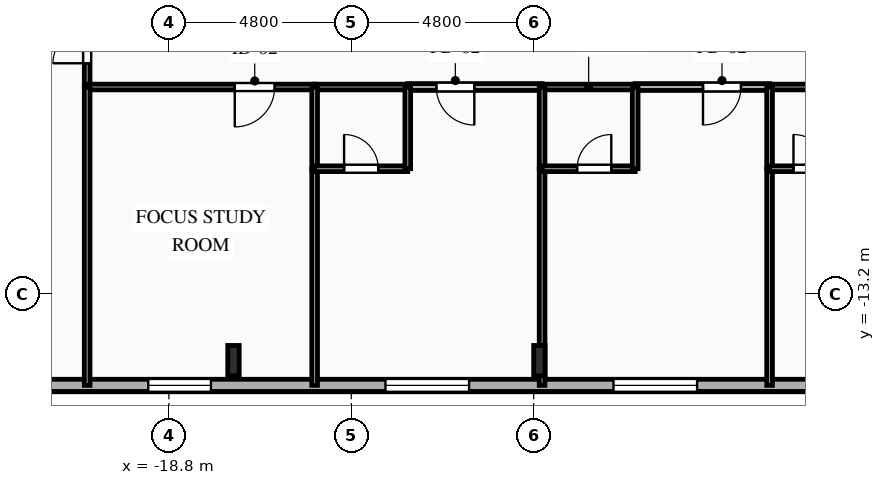
"""IFC4 building model, lengths in metres.
Left out: names, types, materials, properties, quantities, classifications, styles, units other than length and angle.
Written with IfcOpenShell. Run it as: python <this file> out.ifc"""

import sys

from ifc_helpers import new_model, si_unit, direction, frame, frame_2d, origin, origin_2d, place, context, subcontext, project, spatial, rectangle, i_section, extrude, element, fill, save


model = new_model("IFC4")
c1 = context("Model", 3, precision=1e-05, world=origin(), true_north=direction((0.0, 1.0)))
c2 = subcontext(c1, "Body", "Model", "MODEL_VIEW")
j1 = project(units=[si_unit("LENGTHUNIT", "METRE"), si_unit("PLANEANGLEUNIT", "RADIAN")], contexts=[c1])
p1 = place(None, origin())
s1 = spatial("IfcSite", under=j1, at=p1, CompositionType="ELEMENT")
p2 = place(p1, origin())
s2 = spatial("IfcBuilding", under=s1, at=p2, CompositionType="ELEMENT")
p3 = place(p2, frame((0.0, 0.0, 151.1)))
s3 = spatial("IfcBuildingStorey", under=s2, at=p3, CompositionType="ELEMENT", Elevation=151.1)
for number, where, z_axis, x_axis in (
    (1, (-17.1, -14.95, 0.0), (0.0, 0.0, 1.0), (1.0, 0.0, 0.0)),
    (2, (-9.05, -14.95, 0.0), (0.0, 0.0, 1.0), (1.0, 0.0, 0.0)),
):
    element("IfcColumn", number, at=place(p3, frame(where, z_axis=z_axis, x_axis=x_axis)), inside=s3, PredefinedType="COLUMN", context=c2, shape_type="SweptSolid", body=[
        extrude(i_section(OverallWidth=0.3, OverallDepth=0.8, WebThickness=0.018, FlangeThickness=0.033, FilletRadius=0.03, at=origin_2d()), origin(), (0.0, 0.0, 1.0), 3.35),
    ])
p4 = place(p3, frame((23.8, -15.6, 0.0), z_axis=(0.0, 0.0, 1.0), x_axis=(-1.0, 0.0, 0.0)))
e3 = element("IfcWall", 3, at=p4, inside=s3, PredefinedType="SOLIDWALL", context=c2, shape_type="SweptSolid", body=[
    extrude(rectangle(XDim=49.6, YDim=0.32, at=frame_2d((24.8, 0.0))), origin(), (0.0, 0.0, 1.0), 3.04),
])
p5 = place(p4, frame((1.13, 0.0, 0.85)))
e4 = element("IfcOpeningElement", 4, at=p5, cuts=e3, PredefinedType="OPENING", context=c2, shape_type="SweptSolid", body=[
    extrude(rectangle(XDim=1.1, YDim=1.85, at=frame_2d((0.55, 0.925))), frame((0.0, 0.17, 0.0), z_axis=(0.0, -1.0, 0.0), x_axis=(1.0, 0.0, 0.0)), (0.0, 0.0, 1.0), 0.34),
])
p6 = place(p4, frame((5.055, 0.0, 0.85)))
e5 = element("IfcOpeningElement", 5, at=p6, cuts=e3, PredefinedType="OPENING", context=c2, shape_type="SweptSolid", body=[
    extrude(rectangle(XDim=1.65, YDim=1.85, at=frame_2d((0.825, 0.925))), frame((0.0, 0.17, 0.0), z_axis=(0.0, -1.0, 0.0), x_axis=(1.0, 0.0, 0.0)), (0.0, 0.0, 1.0), 0.34),
])
p7 = place(p4, frame((10.78, 0.0, 0.85)))
e6 = element("IfcOpeningElement", 6, at=p7, cuts=e3, PredefinedType="OPENING", context=c2, shape_type="SweptSolid", body=[
    extrude(rectangle(XDim=2.2, YDim=1.85, at=frame_2d((1.1, 0.925))), frame((0.0, 0.17, 0.0), z_axis=(0.0, -1.0, 0.0), x_axis=(1.0, 0.0, 0.0)), (0.0, 0.0, 1.0), 0.34),
])
p8 = place(p4, frame((17.284, 0.0, 0.85)))
e7 = element("IfcOpeningElement", 7, at=p8, cuts=e3, PredefinedType="OPENING", context=c2, shape_type="SweptSolid", body=[
    extrude(rectangle(XDim=2.2, YDim=1.85, at=frame_2d((1.1, 0.925))), frame((0.0, 0.17, 0.0), z_axis=(0.0, -1.0, 0.0), x_axis=(1.0, 0.0, 0.0)), (0.0, 0.0, 1.0), 0.34),
])
p9 = place(p4, frame((22.248, 0.0, 0.85)))
e8 = element("IfcOpeningElement", 8, at=p9, cuts=e3, PredefinedType="OPENING", context=c2, shape_type="SweptSolid", body=[
    extrude(rectangle(XDim=2.2, YDim=1.85, at=frame_2d((1.1, 0.925))), frame((0.0, 0.17, 0.0), z_axis=(0.0, -1.0, 0.0), x_axis=(1.0, 0.0, 0.0)), (0.0, 0.0, 1.0), 0.34),
])
p10 = place(p4, frame((28.7, 0.0, 0.85)))
e9 = element("IfcOpeningElement", 9, at=p10, cuts=e3, PredefinedType="OPENING", context=c2, shape_type="SweptSolid", body=[
    extrude(rectangle(XDim=2.2, YDim=1.85, at=frame_2d((1.1, 0.925))), frame((0.0, 0.17, 0.0), z_axis=(0.0, -1.0, 0.0), x_axis=(1.0, 0.0, 0.0)), (0.0, 0.0, 1.0), 0.34),
])
p11 = place(p4, frame((34.7, 0.0, 0.85)))
e10 = element("IfcOpeningElement", 10, at=p11, cuts=e3, PredefinedType="OPENING", context=c2, shape_type="SweptSolid", body=[
    extrude(rectangle(XDim=2.2, YDim=1.85, at=frame_2d((1.1, 0.925))), frame((0.0, 0.17, 0.0), z_axis=(0.0, -1.0, 0.0), x_axis=(1.0, 0.0, 0.0)), (0.0, 0.0, 1.0), 0.34),
])
p12 = place(p4, frame((41.492, 0.0, 0.85)))
e11 = element("IfcOpeningElement", 11, at=p12, cuts=e3, PredefinedType="OPENING", context=c2, shape_type="SweptSolid", body=[
    extrude(rectangle(XDim=1.65, YDim=1.85, at=frame_2d((0.825, 0.925))), frame((0.0, 0.17, 0.0), z_axis=(0.0, -1.0, 0.0), x_axis=(1.0, 0.0, 0.0)), (0.0, 0.0, 1.0), 0.34),
])
p13 = place(p4, frame((46.175, 0.0, 0.85)))
e12 = element("IfcOpeningElement", 12, at=p13, cuts=e3, PredefinedType="OPENING", context=c2, shape_type="SweptSolid", body=[
    extrude(rectangle(XDim=1.65, YDim=1.85, at=frame_2d((0.825, 0.925))), frame((0.0, 0.17, 0.0), z_axis=(0.0, -1.0, 0.0), x_axis=(1.0, 0.0, 0.0)), (0.0, 0.0, 1.0), 0.34),
])
p14 = place(p3, frame((-20.95, -7.75, 0.0), z_axis=(0.0, 0.0, 1.0), x_axis=(0.0, 1.0, 0.0)))
e13 = element("IfcWall", 13, at=p14, inside=s3, PredefinedType="PARTITIONING", context=c2, shape_type="SweptSolid", body=[
    extrude(rectangle(XDim=2.15, YDim=0.15, at=frame_2d((1.075, 0.0))), origin(), (0.0, 0.0, 1.0), 3.04),
])
p15 = place(p14, frame((0.625, 0.0, 0.0)))
e14 = element("IfcOpeningElement", 14, at=p15, cuts=e13, PredefinedType="OPENING", context=c2, shape_type="SweptSolid", body=[
    extrude(rectangle(XDim=0.9, YDim=2.1, at=frame_2d((0.45, 1.05))), frame((0.0, 0.085, 0.0), z_axis=(0.0, -1.0, 0.0), x_axis=(1.0, 0.0, 0.0)), (0.0, 0.0, 1.0), 0.17),
])
p16 = place(p3, frame((-14.964, -7.75, 0.0), z_axis=(0.0, 0.0, 1.0), x_axis=(-1.0, 0.0, 0.0)))
e15 = element("IfcWall", 15, at=p16, inside=s3, PredefinedType="PARTITIONING", context=c2, shape_type="SweptSolid", body=[
    extrude(rectangle(XDim=5.986, YDim=0.15, at=frame_2d((2.993, 0.0))), origin(), (0.0, 0.0, 1.0), 3.04),
])
p17 = place(p16, frame((1.052, 0.0, 0.0)))
e16 = element("IfcOpeningElement", 16, at=p17, cuts=e15, PredefinedType="OPENING", context=c2, shape_type="SweptSolid", body=[
    extrude(rectangle(XDim=1.05, YDim=2.15, at=frame_2d((0.525, 1.075))), frame((0.0, 0.085, 0.0), z_axis=(0.0, -1.0, 0.0), x_axis=(1.0, 0.0, 0.0)), (0.0, 0.0, 1.0), 0.17),
])
p18 = place(p3, frame((-8.979, -7.75, 0.0), z_axis=(0.0, 0.0, 1.0), x_axis=(-1.0, 0.0, 0.0)))
e17 = element("IfcWall", 17, at=p18, inside=s3, PredefinedType="PARTITIONING", context=c2, shape_type="SweptSolid", body=[
    extrude(rectangle(XDim=3.535, YDim=0.18, at=frame_2d((1.768, 0.0))), origin(), (0.0, 0.0, 1.0), 3.04),
])
p19 = place(p18, frame((1.783, 0.0, 0.0)))
e18 = element("IfcOpeningElement", 18, at=p19, cuts=e17, PredefinedType="OPENING", context=c2, shape_type="SweptSolid", body=[
    extrude(rectangle(XDim=1.0, YDim=2.15, at=frame_2d((0.5, 1.075))), frame((0.0, 0.1, 0.0), z_axis=(0.0, -1.0, 0.0), x_axis=(1.0, 0.0, 0.0)), (0.0, 0.0, 1.0), 0.2),
])
p20 = place(p3, frame((-12.514, -7.75, 0.0), z_axis=(0.0, 0.0, 1.0), x_axis=(-1.0, 0.0, 0.0)))
e19 = element("IfcWall", 19, at=p20, inside=s3, PredefinedType="PLUMBINGWALL", context=c2, shape_type="SweptSolid", body=[
    extrude(rectangle(XDim=2.45, YDim=0.15, at=frame_2d((1.225, 0.0))), origin(), (0.0, 0.0, 1.0), 3.04),
])
p21 = place(p3, frame((-2.993, -7.75, 0.0), z_axis=(0.0, 0.0, 1.0), x_axis=(-1.0, 0.0, 0.0)))
e20 = element("IfcWall", 20, at=p21, inside=s3, PredefinedType="PARTITIONING", context=c2, shape_type="SweptSolid", body=[
    extrude(rectangle(XDim=3.536, YDim=0.18, at=frame_2d((1.768, 0.0))), origin(), (0.0, 0.0, 1.0), 3.04),
])
p22 = place(p21, frame((0.752, 0.0, 0.0)))
e21 = element("IfcOpeningElement", 21, at=p22, cuts=e20, PredefinedType="OPENING", context=c2, shape_type="SweptSolid", body=[
    extrude(rectangle(XDim=1.0, YDim=2.15, at=frame_2d((0.5, 1.075))), frame((0.0, 0.1, 0.0), z_axis=(0.0, -1.0, 0.0), x_axis=(1.0, 0.0, 0.0)), (0.0, 0.0, 1.0), 0.2),
])
for number, where, z_axis, x_axis in (
    (22, (-6.529, -7.75, 0.0), (0.0, 0.0, 1.0), (-1.0, 0.0, 0.0)),
    (23, (-0.543, -7.75, 0.0), (0.0, 0.0, 1.0), (-1.0, 0.0, 0.0)),
):
    element("IfcWall", number, at=place(p3, frame(where, z_axis=z_axis, x_axis=x_axis)), inside=s3, PredefinedType="PLUMBINGWALL", context=c2, shape_type="SweptSolid", body=[
        extrude(rectangle(XDim=2.45, YDim=0.15, at=frame_2d((1.225, 0.0))), origin(), (0.0, 0.0, 1.0), 3.04),
    ])
p23 = place(p3, frame((-20.95, -7.75, 0.0), z_axis=(0.0, 0.0, 1.0), x_axis=(0.0, -1.0, 0.0)))
e24 = element("IfcWall", 24, at=p23, inside=s3, PredefinedType="PARTITIONING", context=c2, shape_type="SweptSolid", body=[
    extrude(rectangle(XDim=7.85, YDim=0.15, at=frame_2d((3.925, 0.0))), origin(), (0.0, 0.0, 1.0), 3.04),
])
p24 = place(p3, frame((-14.964, -9.9, 0.0), z_axis=(0.0, 0.0, 1.0), x_axis=(0.0, -1.0, 0.0)))
e25 = element("IfcWall", 25, at=p24, inside=s3, PredefinedType="PARTITIONING", context=c2, shape_type="SweptSolid", body=[
    extrude(rectangle(XDim=5.7, YDim=0.15, at=frame_2d((2.85, 0.0))), origin(), (0.0, 0.0, 1.0), 3.04),
])
p25 = place(p3, frame((-14.964, -7.75, 0.0), z_axis=(0.0, 0.0, 1.0), x_axis=(0.0, -1.0, 0.0)))
e26 = element("IfcWall", 26, at=p25, inside=s3, PredefinedType="PLUMBINGWALL", context=c2, shape_type="SweptSolid", body=[
    extrude(rectangle(XDim=2.15, YDim=0.15, at=frame_2d((1.075, 0.0))), origin(), (0.0, 0.0, 1.0), 3.04),
])
p26 = place(p3, frame((-14.964, -9.9, 0.0), z_axis=(0.0, 0.0, 1.0), x_axis=(1.0, 0.0, 0.0)))
e27 = element("IfcWall", 27, at=p26, inside=s3, PredefinedType="PLUMBINGWALL", context=c2, shape_type="SweptSolid", body=[
    extrude(rectangle(XDim=2.45, YDim=0.15, at=frame_2d((1.225, 0.0))), origin(), (0.0, 0.0, 1.0), 3.04),
])
p27 = place(p26, frame((0.775, 0.0, 0.0)))
e28 = element("IfcOpeningElement", 28, at=p27, cuts=e27, PredefinedType="OPENING", context=c2, shape_type="SweptSolid", body=[
    extrude(rectangle(XDim=0.9, YDim=2.1, at=frame_2d((0.45, 1.05))), frame((0.0, 0.085, 0.0), z_axis=(0.0, -1.0, 0.0), x_axis=(1.0, 0.0, 0.0)), (0.0, 0.0, 1.0), 0.17),
])
p28 = place(p3, frame((-12.514, -9.9, 0.0), z_axis=(0.0, 0.0, 1.0), x_axis=(0.0, 1.0, 0.0)))
e29 = element("IfcWall", 29, at=p28, inside=s3, PredefinedType="PLUMBINGWALL", context=c2, shape_type="SweptSolid", body=[
    extrude(rectangle(XDim=2.15, YDim=0.15, at=frame_2d((1.075, 0.0))), origin(), (0.0, 0.0, 1.0), 3.04),
])
p29 = place(p3, frame((-8.979, -9.9, 0.0), z_axis=(0.0, 0.0, 1.0), x_axis=(0.0, -1.0, 0.0)))
e30 = element("IfcWall", 30, at=p29, inside=s3, PredefinedType="PARTITIONING", context=c2, shape_type="SweptSolid", body=[
    extrude(rectangle(XDim=5.7, YDim=0.15, at=frame_2d((2.85, 0.0))), origin(), (0.0, 0.0, 1.0), 2.525),
])
p30 = place(p3, frame((-8.979, -7.75, 0.0), z_axis=(0.0, 0.0, 1.0), x_axis=(0.0, -1.0, 0.0)))
e31 = element("IfcWall", 31, at=p30, inside=s3, PredefinedType="PLUMBINGWALL", context=c2, shape_type="SweptSolid", body=[
    extrude(rectangle(XDim=2.15, YDim=0.15, at=frame_2d((1.075, 0.0))), origin(), (0.0, 0.0, 1.0), 2.525),
])
p31 = place(p3, frame((-8.979, -9.9, 0.0), z_axis=(0.0, 0.0, 1.0), x_axis=(1.0, 0.0, 0.0)))
e32 = element("IfcWall", 32, at=p31, inside=s3, PredefinedType="PLUMBINGWALL", context=c2, shape_type="SweptSolid", body=[
    extrude(rectangle(XDim=2.45, YDim=0.15, at=frame_2d((1.225, 0.0))), origin(), (0.0, 0.0, 1.0), 3.04),
])
p32 = place(p31, frame((0.921, 0.0, 0.0)))
e33 = element("IfcOpeningElement", 33, at=p32, cuts=e32, PredefinedType="OPENING", context=c2, shape_type="SweptSolid", body=[
    extrude(rectangle(XDim=0.9, YDim=2.1, at=frame_2d((0.45, 1.05))), frame((0.0, 0.085, 0.0), z_axis=(0.0, -1.0, 0.0), x_axis=(1.0, 0.0, 0.0)), (0.0, 0.0, 1.0), 0.17),
])
p33 = place(p3, frame((-6.529, -9.9, 0.0), z_axis=(0.0, 0.0, 1.0), x_axis=(0.0, 1.0, 0.0)))
e34 = element("IfcWall", 34, at=p33, inside=s3, PredefinedType="PLUMBINGWALL", context=c2, shape_type="SweptSolid", body=[
    extrude(rectangle(XDim=2.15, YDim=0.15, at=frame_2d((1.075, 0.0))), origin(), (0.0, 0.0, 1.0), 3.04),
])
p34 = place(p3, frame((-2.993, -9.9, 0.0), z_axis=(0.0, 0.0, 1.0), x_axis=(0.0, -1.0, 0.0)))
e35 = element("IfcWall", 35, at=p34, inside=s3, PredefinedType="PARTITIONING", context=c2, shape_type="SweptSolid", body=[
    extrude(rectangle(XDim=5.7, YDim=0.15, at=frame_2d((2.85, 0.0))), origin(), (0.0, 0.0, 1.0), 3.04),
])
p35 = place(p3, frame((-2.993, -7.75, 0.0), z_axis=(0.0, 0.0, 1.0), x_axis=(0.0, -1.0, 0.0)))
e36 = element("IfcWall", 36, at=p35, inside=s3, PredefinedType="PLUMBINGWALL", context=c2, shape_type="SweptSolid", body=[
    extrude(rectangle(XDim=2.15, YDim=0.15, at=frame_2d((1.075, 0.0))), origin(), (0.0, 0.0, 1.0), 3.04),
])
p36 = place(p3, frame((-2.993, -9.9, 0.0), z_axis=(0.0, 0.0, 1.0), x_axis=(1.0, 0.0, 0.0)))
e37 = element("IfcWall", 37, at=p36, inside=s3, PredefinedType="PLUMBINGWALL", context=c2, shape_type="SweptSolid", body=[
    extrude(rectangle(XDim=2.45, YDim=0.15, at=frame_2d((1.225, 0.0))), origin(), (0.0, 0.0, 1.0), 3.04),
])
p37 = place(p36, frame((0.629, 0.0, 0.0)))
e38 = element("IfcOpeningElement", 38, at=p37, cuts=e37, PredefinedType="OPENING", context=c2, shape_type="SweptSolid", body=[
    extrude(rectangle(XDim=0.9, YDim=2.1, at=frame_2d((0.45, 1.05))), frame((0.0, 0.085, 0.0), z_axis=(0.0, -1.0, 0.0), x_axis=(1.0, 0.0, 0.0)), (0.0, 0.0, 1.0), 0.17),
])
p38 = place(p10, origin())
e39 = element("IfcWindow", 39, at=p38, inside=s3, PartitioningType="SINGLE_PANEL", PredefinedType="WINDOW", context=c2, shape_type="SweptSolid", body=[
    extrude(rectangle(XDim=2.2, YDim=1.85, at=frame_2d((1.1, 0.925))), frame((0.0, 0.03, 0.0), z_axis=(0.0, -1.0, 0.0), x_axis=(1.0, 0.0, 0.0)), (0.0, 0.0, 1.0), 0.06),
])
fill(e9, e39)
p39 = place(p11, origin())
e40 = element("IfcWindow", 40, at=p39, inside=s3, PartitioningType="SINGLE_PANEL", PredefinedType="WINDOW", context=c2, shape_type="SweptSolid", body=[
    extrude(rectangle(XDim=2.2, YDim=1.85, at=frame_2d((1.1, 0.925))), frame((0.0, 0.03, 0.0), z_axis=(0.0, -1.0, 0.0), x_axis=(1.0, 0.0, 0.0)), (0.0, 0.0, 1.0), 0.06),
])
fill(e10, e40)
p40 = place(p12, origin())
e41 = element("IfcWindow", 41, at=p40, inside=s3, PartitioningType="SINGLE_PANEL", PredefinedType="WINDOW", context=c2, shape_type="SweptSolid", body=[
    extrude(rectangle(XDim=1.65, YDim=1.85, at=frame_2d((0.825, 0.925))), frame((0.0, 0.03, 0.0), z_axis=(0.0, -1.0, 0.0), x_axis=(1.0, 0.0, 0.0)), (0.0, 0.0, 1.0), 0.06),
])
fill(e11, e41)
p41 = place(p15, origin())
e42 = element("IfcDoor", 42, at=p41, inside=s3, OperationType="SINGLE_SWING_LEFT", PredefinedType="DOOR", context=c2, shape_type="SweptSolid", body=[
    extrude(rectangle(XDim=0.9, YDim=2.1, at=frame_2d((0.45, 1.05))), frame((0.0, 0.025, 0.0), z_axis=(0.0, -1.0, 0.0), x_axis=(1.0, 0.0, 0.0)), (0.0, 0.0, 1.0), 0.05),
])
fill(e14, e42)
p42 = place(p17, origin())
e43 = element("IfcDoor", 43, at=p42, inside=s3, OperationType="SINGLE_SWING_RIGHT", PredefinedType="DOOR", context=c2, shape_type="SweptSolid", body=[
    extrude(rectangle(XDim=1.05, YDim=2.15, at=frame_2d((0.525, 1.075))), frame((0.0, 0.025, 0.0), z_axis=(0.0, -1.0, 0.0), x_axis=(1.0, 0.0, 0.0)), (0.0, 0.0, 1.0), 0.05),
])
fill(e16, e43)
p43 = place(p19, origin())
e44 = element("IfcDoor", 44, at=p43, inside=s3, OperationType="SINGLE_SWING_LEFT", PredefinedType="DOOR", context=c2, shape_type="SweptSolid", body=[
    extrude(rectangle(XDim=1.0, YDim=2.15, at=frame_2d((0.5, 1.075))), frame((0.0, 0.025, 0.0), z_axis=(0.0, -1.0, 0.0), x_axis=(1.0, 0.0, 0.0)), (0.0, 0.0, 1.0), 0.05),
])
fill(e18, e44)
p44 = place(p22, origin())
e45 = element("IfcDoor", 45, at=p44, inside=s3, OperationType="SINGLE_SWING_RIGHT", PredefinedType="DOOR", context=c2, shape_type="SweptSolid", body=[
    extrude(rectangle(XDim=1.0, YDim=2.15, at=frame_2d((0.5, 1.075))), frame((0.0, 0.025, 0.0), z_axis=(0.0, -1.0, 0.0), x_axis=(1.0, 0.0, 0.0)), (0.0, 0.0, 1.0), 0.05),
])
fill(e21, e45)
p45 = place(p27, origin())
e46 = element("IfcDoor", 46, at=p45, inside=s3, OperationType="SINGLE_SWING_LEFT", PredefinedType="DOOR", context=c2, shape_type="SweptSolid", body=[
    extrude(rectangle(XDim=0.9, YDim=2.1, at=frame_2d((0.45, 1.05))), frame((0.0, 0.025, 0.0), z_axis=(0.0, -1.0, 0.0), x_axis=(1.0, 0.0, 0.0)), (0.0, 0.0, 1.0), 0.05),
])
fill(e28, e46)
p46 = place(p32, origin())
e47 = element("IfcDoor", 47, at=p46, inside=s3, OperationType="SINGLE_SWING_RIGHT", PredefinedType="DOOR", context=c2, shape_type="SweptSolid", body=[
    extrude(rectangle(XDim=0.9, YDim=2.1, at=frame_2d((0.45, 1.05))), frame((0.0, 0.025, 0.0), z_axis=(0.0, -1.0, 0.0), x_axis=(1.0, 0.0, 0.0)), (0.0, 0.0, 1.0), 0.05),
])
fill(e33, e47)
p47 = place(p37, origin())
e48 = element("IfcDoor", 48, at=p47, inside=s3, OperationType="SINGLE_SWING_LEFT", PredefinedType="DOOR", context=c2, shape_type="SweptSolid", body=[
    extrude(rectangle(XDim=0.9, YDim=2.1, at=frame_2d((0.45, 1.05))), frame((0.0, 0.025, 0.0), z_axis=(0.0, -1.0, 0.0), x_axis=(1.0, 0.0, 0.0)), (0.0, 0.0, 1.0), 0.05),
])
fill(e38, e48)
save(model, sys.argv[1])
